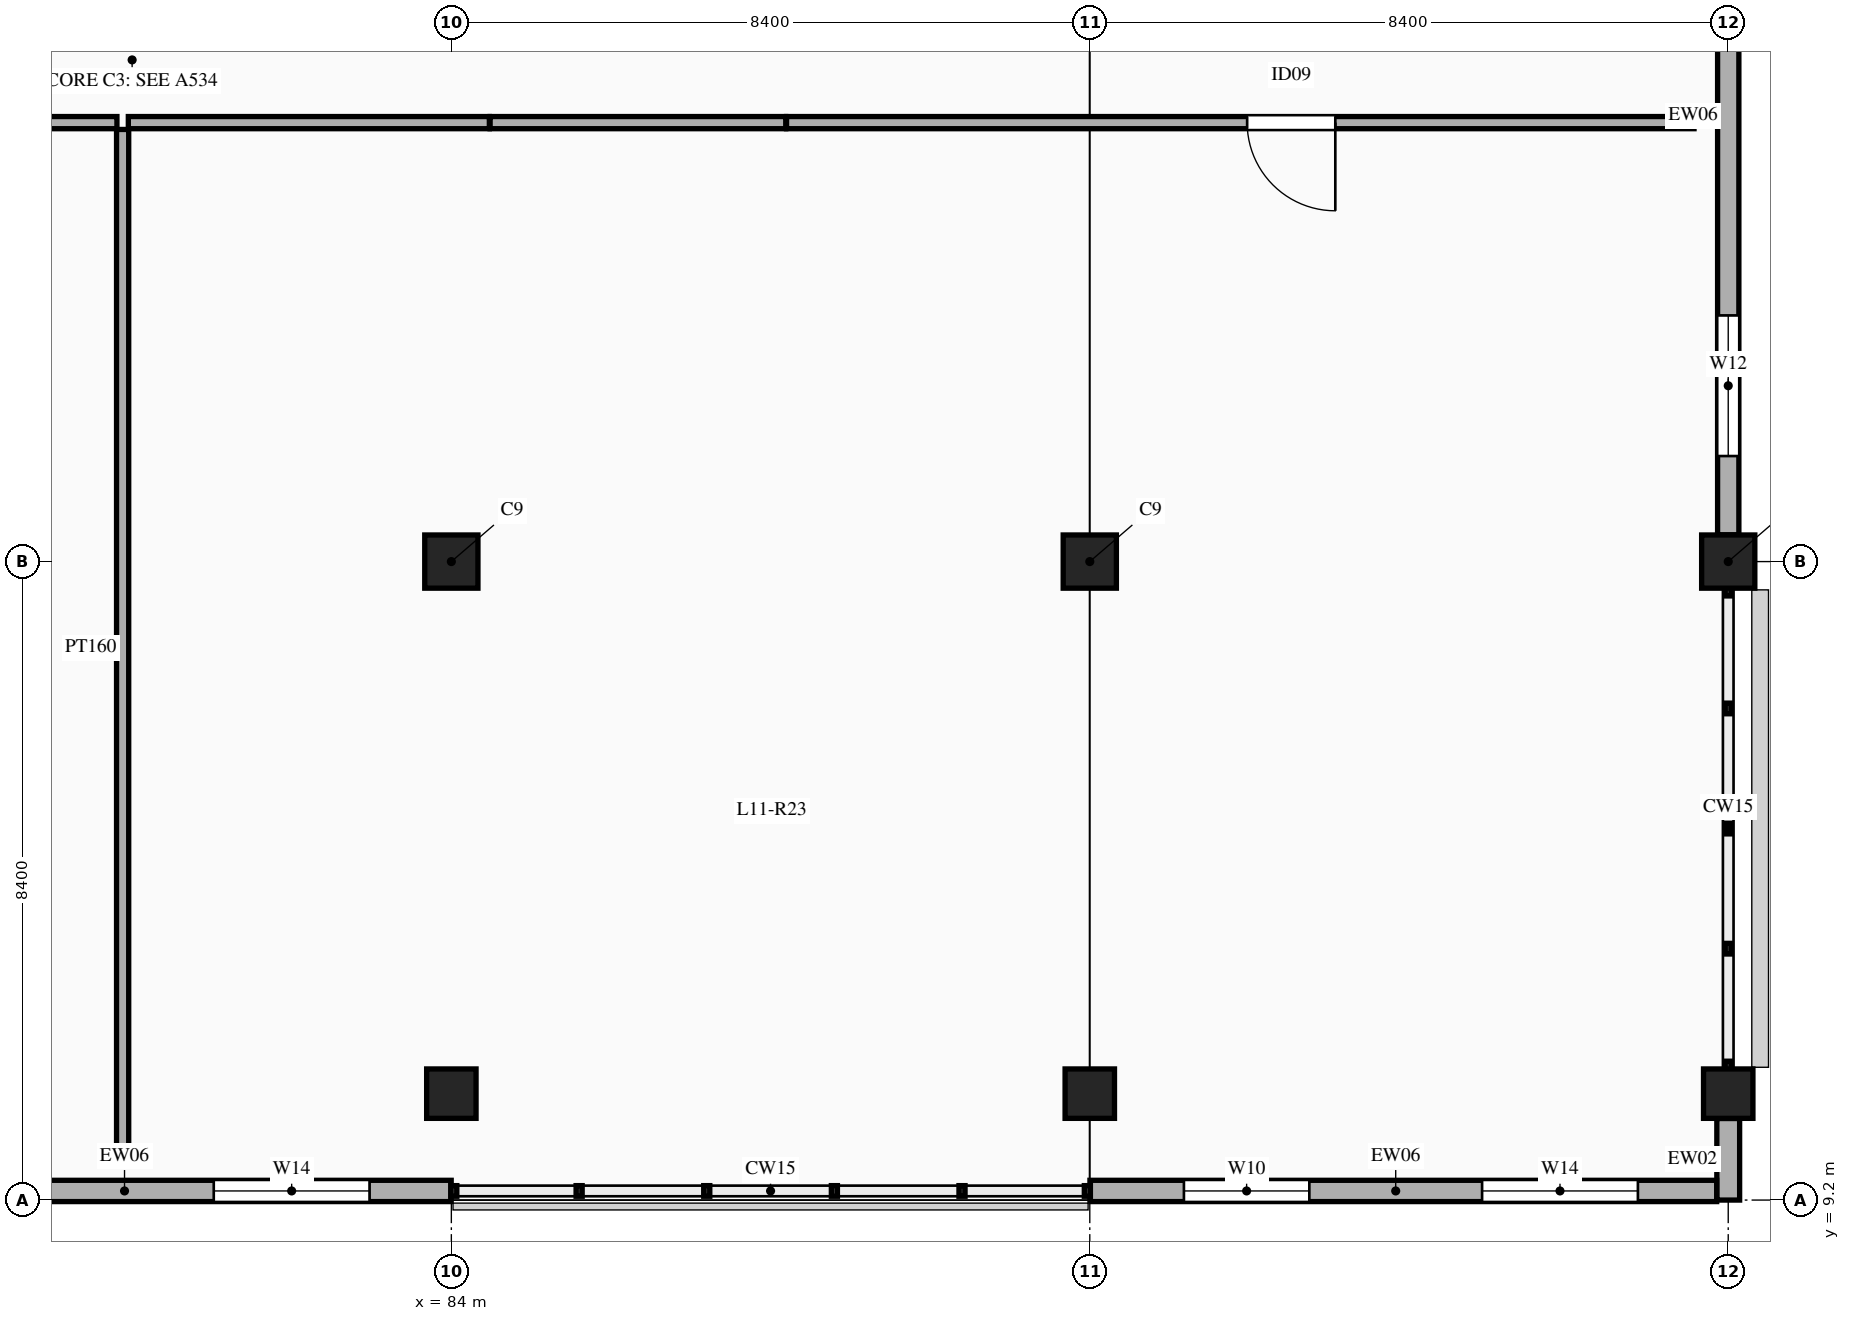
"""IFC4 building model, lengths in metres.
Left out: names, types, materials, properties, quantities, classifications, styles, units other than length and angle.
Written with IfcOpenShell. Run it as: python <this file> out.ifc"""

import sys

from ifc_helpers import new_model, si_unit, direction, frame, frame_2d, origin, origin_2d, place, context, subcontext, project, spatial, rectangle, extrude, element, fill, save


model = new_model("IFC4")
c1 = context("Model", 3, precision=1e-05, world=origin(), true_north=direction((0.0, 1.0)))
c2 = subcontext(c1, "Body", "Model", "MODEL_VIEW")
j1 = project(units=[si_unit("LENGTHUNIT", "METRE"), si_unit("PLANEANGLEUNIT", "RADIAN")], contexts=[c1])
p1 = place(None, origin())
s1 = spatial("IfcSite", under=j1, at=p1, CompositionType="ELEMENT")
p2 = place(p1, origin())
s2 = spatial("IfcBuilding", under=s1, at=p2, CompositionType="ELEMENT")
p3 = place(p2, frame((0.0, 0.0, 51.0)))
s3 = spatial("IfcBuildingStorey", under=s2, at=p3, CompositionType="ELEMENT", Elevation=51.0)
p4 = place(p3, frame((84.0, 10.6, 0.0), z_axis=(0.0, 0.0, 1.0), x_axis=(1.0, 0.0, 0.0)))
e1 = element("IfcColumn", 1, at=p4, inside=s3, PredefinedType="COLUMN", context=c2, shape_type="SweptSolid", body=[
    extrude(rectangle(XDim=0.65, YDim=0.65, at=origin_2d()), origin(), (0.0, 0.0, 1.0), 4.5),
])
p5 = place(p3, frame((84.0, 17.6, 0.0), z_axis=(0.0, 0.0, 1.0), x_axis=(1.0, 0.0, 0.0)))
e2 = element("IfcColumn", 2, at=p5, inside=s3, PredefinedType="COLUMN", context=c2, shape_type="SweptSolid", body=[
    extrude(rectangle(XDim=0.7, YDim=0.7, at=origin_2d()), origin(), (0.0, 0.0, 1.0), 4.5),
])
p6 = place(p3, frame((92.4, 10.6, 0.0), z_axis=(0.0, 0.0, 1.0), x_axis=(1.0, 0.0, 0.0)))
e3 = element("IfcColumn", 3, at=p6, inside=s3, PredefinedType="COLUMN", context=c2, shape_type="SweptSolid", body=[
    extrude(rectangle(XDim=0.65, YDim=0.65, at=origin_2d()), origin(), (0.0, 0.0, 1.0), 4.5),
])
p7 = place(p3, frame((92.4, 17.6, 0.0), z_axis=(0.0, 0.0, 1.0), x_axis=(1.0, 0.0, 0.0)))
e4 = element("IfcColumn", 4, at=p7, inside=s3, PredefinedType="COLUMN", context=c2, shape_type="SweptSolid", body=[
    extrude(rectangle(XDim=0.7, YDim=0.7, at=origin_2d()), origin(), (0.0, 0.0, 1.0), 4.5),
])
p8 = place(p3, frame((100.8, 10.6, 0.0), z_axis=(0.0, 0.0, 1.0), x_axis=(1.0, 0.0, 0.0)))
e5 = element("IfcColumn", 5, at=p8, inside=s3, PredefinedType="COLUMN", context=c2, shape_type="SweptSolid", body=[
    extrude(rectangle(XDim=0.65, YDim=0.65, at=origin_2d()), origin(), (0.0, 0.0, 1.0), 4.5),
])
p9 = place(p3, frame((100.8, 17.6, 0.0), z_axis=(0.0, 0.0, 1.0), x_axis=(1.0, 0.0, 0.0)))
e6 = element("IfcColumn", 6, at=p9, inside=s3, PredefinedType="COLUMN", context=c2, shape_type="SweptSolid", body=[
    extrude(rectangle(XDim=0.7, YDim=0.7, at=origin_2d()), origin(), (0.0, 0.0, 1.0), 4.5),
])
p10 = place(p3, frame((100.8, 9.2, 0.0), z_axis=(0.0, 0.0, 1.0), x_axis=(0.0, 1.0, 0.0)))
e7 = element("IfcWall", 7, at=p10, inside=s3, PredefinedType="SOLIDWALL", context=c2, shape_type="SweptSolid", body=[
    extrude(rectangle(XDim=1.073, YDim=0.3, at=frame_2d((0.537, 0.0))), origin(), (0.0, 0.0, 1.0), 3.55),
])
p11 = place(p3, frame((75.602, 9.32, 0.0), z_axis=(0.0, 0.0, 1.0), x_axis=(1.0, 0.0, 0.0)))
e8 = element("IfcWall", 8, at=p11, inside=s3, PredefinedType="ELEMENTEDWALL", context=c2, shape_type="SweptSolid", body=[
    extrude(rectangle(XDim=8.396, YDim=0.28, at=frame_2d((4.198, 0.0))), origin(), (0.0, 0.0, 1.0), 3.55),
])
p12 = place(p11, frame((1.274, 0.0, 0.9)))
e9 = element("IfcOpeningElement", 9, at=p12, cuts=e8, PredefinedType="OPENING", context=c2, shape_type="SweptSolid", body=[
    extrude(rectangle(XDim=1.65, YDim=1.95, at=frame_2d((0.825, 0.975))), frame((0.0, 0.15, 0.0), z_axis=(0.0, -1.0, 0.0), x_axis=(1.0, 0.0, 0.0)), (0.0, 0.0, 1.0), 0.3),
])
p13 = place(p11, frame((5.272, 0.0, 0.9)))
e10 = element("IfcOpeningElement", 10, at=p13, cuts=e8, PredefinedType="OPENING", context=c2, shape_type="SweptSolid", body=[
    extrude(rectangle(XDim=2.05, YDim=2.1, at=frame_2d((1.025, 1.05))), frame((0.0, 0.15, 0.0), z_axis=(0.0, -1.0, 0.0), x_axis=(1.0, 0.0, 0.0)), (0.0, 0.0, 1.0), 0.3),
])
p14 = place(p3, frame((92.402, 9.32, 0.0), z_axis=(0.0, 0.0, 1.0), x_axis=(1.0, 0.0, 0.0)))
e11 = element("IfcWall", 11, at=p14, inside=s3, PredefinedType="ELEMENTEDWALL", context=c2, shape_type="SweptSolid", body=[
    extrude(rectangle(XDim=8.246, YDim=0.28, at=frame_2d((4.123, 0.0))), origin(), (0.0, 0.0, 1.0), 3.55),
])
p15 = place(p14, frame((1.237, 0.0, 0.9)))
e12 = element("IfcOpeningElement", 12, at=p15, cuts=e11, PredefinedType="OPENING", context=c2, shape_type="SweptSolid", body=[
    extrude(rectangle(XDim=1.65, YDim=1.95, at=frame_2d((0.825, 0.975))), frame((0.0, 0.15, 0.0), z_axis=(0.0, -1.0, 0.0), x_axis=(1.0, 0.0, 0.0)), (0.0, 0.0, 1.0), 0.3),
])
p16 = place(p14, frame((5.159, 0.0, 0.9)))
e13 = element("IfcOpeningElement", 13, at=p16, cuts=e11, PredefinedType="OPENING", context=c2, shape_type="SweptSolid", body=[
    extrude(rectangle(XDim=2.05, YDim=2.1, at=frame_2d((1.025, 1.05))), frame((0.0, 0.15, 0.0), z_axis=(0.0, -1.0, 0.0), x_axis=(1.0, 0.0, 0.0)), (0.0, 0.0, 1.0), 0.3),
])
p17 = place(p3, frame((100.8, 17.952, 0.0), z_axis=(0.0, 0.0, 1.0), x_axis=(0.0, 1.0, 0.0)))
e14 = element("IfcWall", 14, at=p17, inside=s3, PredefinedType="ELEMENTEDWALL", context=c2, shape_type="SweptSolid", body=[
    extrude(rectangle(XDim=7.846, YDim=0.28, at=frame_2d((3.923, 0.0))), origin(), (0.0, 0.0, 1.0), 3.55),
])
p18 = place(p17, frame((1.037, 0.0, 0.9)))
e15 = element("IfcOpeningElement", 15, at=p18, cuts=e14, PredefinedType="OPENING", context=c2, shape_type="SweptSolid", body=[
    extrude(rectangle(XDim=1.85, YDim=2.05, at=frame_2d((0.925, 1.025))), frame((0.0, 0.15, 0.0), z_axis=(0.0, -1.0, 0.0), x_axis=(1.0, 0.0, 0.0)), (0.0, 0.0, 1.0), 0.3),
])
p19 = place(p3, frame((76.05, 23.375, 0.0), z_axis=(0.0, 0.0, 1.0), x_axis=(1.0, 0.0, 0.0)))
e16 = element("IfcWall", 16, at=p19, inside=s3, PredefinedType="PARTITIONING", context=c2, shape_type="SweptSolid", body=[
    extrude(rectangle(XDim=3.55, YDim=0.16, at=frame_2d((1.775, 0.0))), origin(), (0.0, 0.0, 1.0), 3.45),
])
p20 = place(p3, frame((79.75, 23.375, 0.0), z_axis=(0.0, 0.0, 1.0), x_axis=(1.0, 0.0, 0.0)))
e17 = element("IfcWall", 17, at=p20, inside=s3, PredefinedType="PARTITIONING", context=c2, shape_type="SweptSolid", body=[
    extrude(rectangle(XDim=4.75, YDim=0.16, at=frame_2d((2.375, 0.0))), origin(), (0.0, 0.0, 1.0), 3.45),
])
p21 = place(p3, frame((84.51, 23.375, 0.0), z_axis=(0.0, 0.0, 1.0), x_axis=(1.0, 0.0, 0.0)))
e18 = element("IfcWall", 18, at=p21, inside=s3, PredefinedType="PARTITIONING", context=c2, shape_type="SweptSolid", body=[
    extrude(rectangle(XDim=3.89, YDim=0.16, at=frame_2d((1.945, 0.0))), origin(), (0.0, 0.0, 1.0), 3.45),
])
p22 = place(p3, frame((88.41, 23.375, 0.0), z_axis=(0.0, 0.0, 1.0), x_axis=(1.0, 0.0, 0.0)))
e19 = element("IfcWall", 19, at=p22, inside=s3, PredefinedType="PARTITIONING", context=c2, shape_type="SweptSolid", body=[
    extrude(rectangle(XDim=11.94, YDim=0.16, at=frame_2d((5.97, 0.0))), origin(), (0.0, 0.0, 1.0), 3.45),
])
p23 = place(p22, frame((6.06, 0.0, 0.0)))
e20 = element("IfcOpeningElement", 20, at=p23, cuts=e19, PredefinedType="OPENING", context=c2, shape_type="SweptSolid", body=[
    extrude(rectangle(XDim=1.16, YDim=2.2, at=frame_2d((0.58, 1.1))), frame((0.0, 0.09, 0.0), z_axis=(0.0, -1.0, 0.0), x_axis=(1.0, 0.0, 0.0)), (0.0, 0.0, 1.0), 0.18),
])
p24 = place(p3, frame((79.675, 9.65, 0.0), z_axis=(0.0, 0.0, 1.0), x_axis=(0.0, 1.0, 0.0)))
e21 = element("IfcWall", 21, at=p24, inside=s3, PredefinedType="PARTITIONING", context=c2, shape_type="SweptSolid", body=[
    extrude(rectangle(XDim=13.635, YDim=0.16, at=frame_2d((6.817, 0.0))), origin(), (0.0, 0.0, 1.0), 3.45),
])
p25 = place(p13, origin())
e22 = element("IfcWindow", 22, at=p25, inside=s3, PartitioningType="TRIPLE_PANEL_VERTICAL", PredefinedType="WINDOW", context=c2, shape_type="SweptSolid", body=[
    extrude(rectangle(XDim=2.05, YDim=2.1, at=frame_2d((1.025, 1.05))), frame((0.0, 0.03, 0.0), z_axis=(0.0, -1.0, 0.0), x_axis=(1.0, 0.0, 0.0)), (0.0, 0.0, 1.0), 0.06),
])
fill(e10, e22)
p26 = place(p15, origin())
e23 = element("IfcWindow", 23, at=p26, inside=s3, PartitioningType="DOUBLE_PANEL_HORIZONTAL", PredefinedType="WINDOW", context=c2, shape_type="SweptSolid", body=[
    extrude(rectangle(XDim=1.65, YDim=1.95, at=frame_2d((0.825, 0.975))), frame((0.0, 0.03, 0.0), z_axis=(0.0, -1.0, 0.0), x_axis=(1.0, 0.0, 0.0)), (0.0, 0.0, 1.0), 0.06),
])
fill(e12, e23)
p27 = place(p16, origin())
e24 = element("IfcWindow", 24, at=p27, inside=s3, PartitioningType="TRIPLE_PANEL_VERTICAL", PredefinedType="WINDOW", context=c2, shape_type="SweptSolid", body=[
    extrude(rectangle(XDim=2.05, YDim=2.1, at=frame_2d((1.025, 1.05))), frame((0.0, 0.03, 0.0), z_axis=(0.0, -1.0, 0.0), x_axis=(1.0, 0.0, 0.0)), (0.0, 0.0, 1.0), 0.06),
])
fill(e13, e24)
p28 = place(p18, origin())
e25 = element("IfcWindow", 25, at=p28, inside=s3, PartitioningType="DOUBLE_PANEL_HORIZONTAL", PredefinedType="WINDOW", context=c2, shape_type="SweptSolid", body=[
    extrude(rectangle(XDim=1.85, YDim=2.05, at=frame_2d((0.925, 1.025))), frame((0.0, 0.03, 0.0), z_axis=(0.0, -1.0, 0.0), x_axis=(1.0, 0.0, 0.0)), (0.0, 0.0, 1.0), 0.06),
])
fill(e15, e25)
p29 = place(p23, frame((1.16, 0.0, 0.0), z_axis=(0.0, 0.0, 1.0), x_axis=(-1.0, 0.0, 0.0)))
e26 = element("IfcDoor", 26, at=p29, inside=s3, OperationType="SINGLE_SWING_LEFT", PredefinedType="DOOR", context=c2, shape_type="SweptSolid", body=[
    extrude(rectangle(XDim=1.16, YDim=2.2, at=frame_2d((0.58, 1.1))), frame((0.0, 0.025, 0.0), z_axis=(0.0, -1.0, 0.0), x_axis=(1.0, 0.0, 0.0)), (0.0, 0.0, 1.0), 0.05),
])
fill(e20, e26)
save(model, sys.argv[1])
